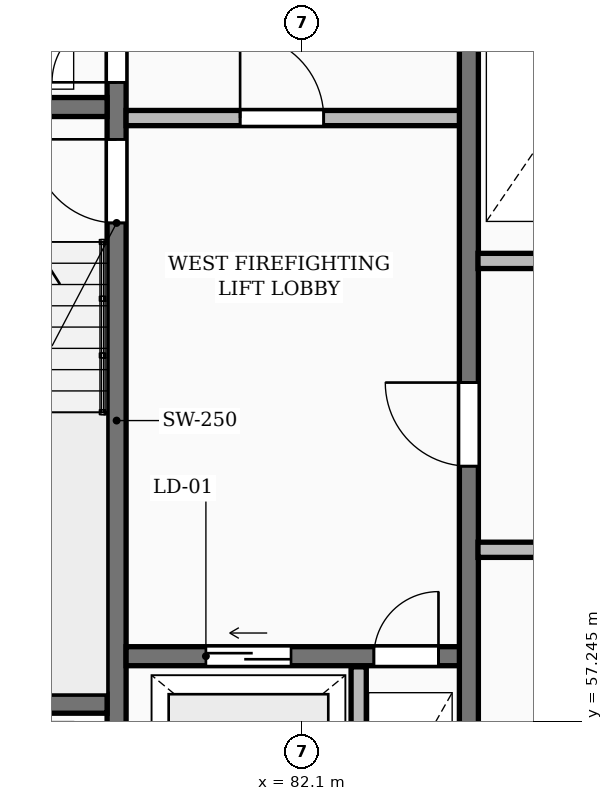
"""IFC4 building model, lengths in metres.
Left out: names, types, materials, properties, quantities, classifications, styles, units other than length and angle.
Written with IfcOpenShell. Run it as: python <this file> out.ifc"""

import sys

from ifc_helpers import new_model, si_unit, direction, frame, frame_2d, origin, place, context, subcontext, project, spatial, rectangle, extrude, element, fill, save


model = new_model("IFC4")
c1 = context("Model", 3, precision=1e-05, world=origin(), true_north=direction((0.0, 1.0)))
c2 = subcontext(c1, "Body", "Model", "MODEL_VIEW")
j1 = project(units=[si_unit("LENGTHUNIT", "METRE"), si_unit("PLANEANGLEUNIT", "RADIAN")], contexts=[c1])
p1 = place(None, origin())
s1 = spatial("IfcSite", under=j1, at=p1, CompositionType="ELEMENT")
p2 = place(p1, origin())
s2 = spatial("IfcBuilding", under=s1, at=p2, CompositionType="ELEMENT")
p3 = place(p2, frame((0.0, 0.0, 175.1)))
s3 = spatial("IfcBuildingStorey", under=s2, at=p3, CompositionType="ELEMENT", Elevation=175.1)
p4 = place(p3, frame((79.665, 55.4, 0.0), z_axis=(0.0, 0.0, 1.0), x_axis=(0.0, 1.0, 0.0)))
e1 = element("IfcWall", 1, at=p4, inside=s3, PredefinedType="SHEAR", context=c2, shape_type="SweptSolid", body=[
    extrude(rectangle(XDim=11.6, YDim=0.25, at=frame_2d((5.8, 0.0))), origin(), (0.0, 0.0, 1.0), 3.25),
])
p5 = place(p4, frame((0.55, 0.0, 0.0)))
e2 = element("IfcOpeningElement", 2, at=p5, cuts=e1, PredefinedType="OPENING", context=c2, shape_type="SweptSolid", body=[
    extrude(rectangle(XDim=0.85, YDim=2.05, at=frame_2d((0.425, 1.025))), frame((0.0, 0.135, 0.0), z_axis=(0.0, -1.0, 0.0), x_axis=(1.0, 0.0, 0.0)), (0.0, 0.0, 1.0), 0.27),
])
p6 = place(p4, frame((8.4, 0.0, 0.0)))
e3 = element("IfcOpeningElement", 3, at=p6, cuts=e1, PredefinedType="OPENING", context=c2, shape_type="SweptSolid", body=[
    extrude(rectangle(XDim=1.1, YDim=2.1, at=frame_2d((0.55, 1.05))), frame((0.0, 0.135, 0.0), z_axis=(0.0, -1.0, 0.0), x_axis=(1.0, 0.0, 0.0)), (0.0, 0.0, 1.0), 0.27),
])
p7 = place(p4, frame((10.25, 0.0, 0.0)))
e4 = element("IfcOpeningElement", 4, at=p7, cuts=e1, PredefinedType="OPENING", context=c2, shape_type="SweptSolid", body=[
    extrude(rectangle(XDim=0.85, YDim=2.05, at=frame_2d((0.425, 1.025))), frame((0.0, 0.135, 0.0), z_axis=(0.0, -1.0, 0.0), x_axis=(1.0, 0.0, 0.0)), (0.0, 0.0, 1.0), 0.27),
])
for number, where, z_axis, x_axis in (
    (5, (76.3, 57.475, 0.0), (0.0, 0.0, 1.0), (1.0, 0.0, 0.0)),
    (6, (76.3, 65.325, 0.0), (0.0, 0.0, 1.0), (1.0, 0.0, 0.0)),
):
    element("IfcWall", number, at=place(p3, frame(where, z_axis=z_axis, x_axis=x_axis)), inside=s3, PredefinedType="SHEAR", context=c2, shape_type="SweptSolid", body=[
        extrude(rectangle(XDim=3.24, YDim=0.25, at=frame_2d((1.62, 0.0))), origin(), (0.0, 0.0, 1.0), 3.25),
    ])
p8 = place(p3, frame((79.79, 58.1, 0.0), z_axis=(0.0, 0.0, 1.0), x_axis=(1.0, 0.0, 0.0)))
e7 = element("IfcWall", 7, at=p8, inside=s3, PredefinedType="SHEAR", context=c2, shape_type="SweptSolid", body=[
    extrude(rectangle(XDim=4.39, YDim=0.25, at=frame_2d((2.195, 0.0))), origin(), (0.0, 0.0, 1.0), 3.25),
])
p9 = place(p8, frame((1.05, 0.0, 0.0)))
e8 = element("IfcOpeningElement", 8, at=p9, cuts=e7, PredefinedType="OPENING", context=c2, shape_type="SweptSolid", body=[
    extrude(rectangle(XDim=1.12, YDim=2.12, at=frame_2d((0.56, 1.06))), frame((0.0, 0.135, 0.0), z_axis=(0.0, -1.0, 0.0), x_axis=(1.0, 0.0, 0.0)), (0.0, 0.0, 1.0), 0.27),
])
p10 = place(p8, frame((3.26, 0.0, 0.0)))
e9 = element("IfcOpeningElement", 9, at=p10, cuts=e7, PredefinedType="OPENING", context=c2, shape_type="SweptSolid", body=[
    extrude(rectangle(XDim=0.85, YDim=2.05, at=frame_2d((0.425, 1.025))), frame((0.0, 0.135, 0.0), z_axis=(0.0, -1.0, 0.0), x_axis=(1.0, 0.0, 0.0)), (0.0, 0.0, 1.0), 0.27),
])
p11 = place(p3, frame((82.85, 55.4, 0.0), z_axis=(0.0, 0.0, 1.0), x_axis=(0.0, 1.0, 0.0)))
e10 = element("IfcWall", 10, at=p11, inside=s3, PredefinedType="PARTITIONING", context=c2, shape_type="SweptSolid", body=[
    extrude(rectangle(XDim=2.56, YDim=0.2, at=frame_2d((1.28, 0.0))), origin(), (0.0, 0.0, 1.0), 2.97),
])
p12 = place(p3, frame((79.79, 65.18, 0.0), z_axis=(0.0, 0.0, 1.0), x_axis=(1.0, 0.0, 0.0)))
e11 = element("IfcWall", 11, at=p12, inside=s3, PredefinedType="PARTITIONING", context=c2, shape_type="SweptSolid", body=[
    extrude(rectangle(XDim=4.39, YDim=0.2, at=frame_2d((2.195, 0.0))), origin(), (0.0, 0.0, 1.0), 2.97),
])
p13 = place(p12, frame((1.5, 0.0, 0.0)))
e12 = element("IfcOpeningElement", 12, at=p13, cuts=e11, PredefinedType="OPENING", context=c2, shape_type="SweptSolid", body=[
    extrude(rectangle(XDim=1.1, YDim=2.1, at=frame_2d((0.55, 1.05))), frame((0.0, 0.11, 0.0), z_axis=(0.0, -1.0, 0.0), x_axis=(1.0, 0.0, 0.0)), (0.0, 0.0, 1.0), 0.22),
])
p14 = place(p3, frame((84.3, 55.4, 0.0), z_axis=(0.0, 0.0, 1.0), x_axis=(0.0, 1.0, 0.0)))
e13 = element("IfcWall", 13, at=p14, inside=s3, PredefinedType="SHEAR", context=c2, shape_type="SweptSolid", body=[
    extrude(rectangle(XDim=11.6, YDim=0.25, at=frame_2d((5.8, 0.0))), origin(), (0.0, 0.0, 1.0), 3.25),
])
p15 = place(p14, frame((5.2, 0.0, 0.0)))
e14 = element("IfcOpeningElement", 14, at=p15, cuts=e13, PredefinedType="OPENING", context=c2, shape_type="SweptSolid", body=[
    extrude(rectangle(XDim=1.1, YDim=2.1, at=frame_2d((0.55, 1.05))), frame((0.0, 0.135, 0.0), z_axis=(0.0, -1.0, 0.0), x_axis=(1.0, 0.0, 0.0)), (0.0, 0.0, 1.0), 0.27),
])
p16 = place(p3, frame((84.42, 59.5, 0.0), z_axis=(0.0, 0.0, 1.0), x_axis=(1.0, 0.0, 0.0)))
e15 = element("IfcWall", 15, at=p16, inside=s3, PredefinedType="PARTITIONING", context=c2, shape_type="SweptSolid", body=[
    extrude(rectangle(XDim=8.36, YDim=0.2, at=frame_2d((4.18, 0.0))), origin(), (0.0, 0.0, 1.0), 2.97),
])
p17 = place(p16, frame((3.4, 0.0, 0.0)))
e16 = element("IfcOpeningElement", 16, at=p17, cuts=e15, PredefinedType="OPENING", context=c2, shape_type="SweptSolid", body=[
    extrude(rectangle(XDim=0.92, YDim=2.08, at=frame_2d((0.46, 1.04))), frame((0.0, 0.11, 0.0), z_axis=(0.0, -1.0, 0.0), x_axis=(1.0, 0.0, 0.0)), (0.0, 0.0, 1.0), 0.22),
])
p18 = place(p3, frame((84.42, 63.3, 0.0), z_axis=(0.0, 0.0, 1.0), x_axis=(1.0, 0.0, 0.0)))
e17 = element("IfcWall", 17, at=p18, inside=s3, PredefinedType="PARTITIONING", context=c2, shape_type="SweptSolid", body=[
    extrude(rectangle(XDim=19.83, YDim=0.2, at=frame_2d((9.915, 0.0))), origin(), (0.0, 0.0, 1.0), 2.97),
])
p19 = place(p18, frame((1.15, 0.0, 0.0)))
e18 = element("IfcOpeningElement", 18, at=p19, cuts=e17, PredefinedType="OPENING", context=c2, shape_type="SweptSolid", body=[
    extrude(rectangle(XDim=0.85, YDim=2.05, at=frame_2d((0.425, 1.025))), frame((0.0, 0.11, 0.0), z_axis=(0.0, -1.0, 0.0), x_axis=(1.0, 0.0, 0.0)), (0.0, 0.0, 1.0), 0.22),
])
p20 = place(p18, frame((3.25, 0.0, 0.0)))
e19 = element("IfcOpeningElement", 19, at=p20, cuts=e17, PredefinedType="OPENING", context=c2, shape_type="SweptSolid", body=[
    extrude(rectangle(XDim=0.85, YDim=2.05, at=frame_2d((0.425, 1.025))), frame((0.0, 0.11, 0.0), z_axis=(0.0, -1.0, 0.0), x_axis=(1.0, 0.0, 0.0)), (0.0, 0.0, 1.0), 0.22),
])
p21 = place(p18, frame((13.08, 0.0, 0.0)))
e20 = element("IfcOpeningElement", 20, at=p21, cuts=e17, PredefinedType="OPENING", context=c2, shape_type="SweptSolid", body=[
    extrude(rectangle(XDim=1.5, YDim=2.2, at=frame_2d((0.75, 1.1))), frame((0.0, 0.11, 0.0), z_axis=(0.0, -1.0, 0.0), x_axis=(1.0, 0.0, 0.0)), (0.0, 0.0, 1.0), 0.22),
])
p22 = place(p18, frame((6.68, 0.0, 0.0)))
e21 = element("IfcOpeningElement", 21, at=p22, cuts=e17, PredefinedType="OPENING", context=c2, shape_type="SweptSolid", body=[
    extrude(rectangle(XDim=0.92, YDim=2.08, at=frame_2d((0.46, 1.04))), frame((0.0, 0.11, 0.0), z_axis=(0.0, -1.0, 0.0), x_axis=(1.0, 0.0, 0.0)), (0.0, 0.0, 1.0), 0.22),
])
p23 = place(p18, frame((16.33, 0.0, 0.0)))
e22 = element("IfcOpeningElement", 22, at=p23, cuts=e17, PredefinedType="OPENING", context=c2, shape_type="SweptSolid", body=[
    extrude(rectangle(XDim=0.88, YDim=2.06, at=frame_2d((0.44, 1.03))), frame((0.0, 0.11, 0.0), z_axis=(0.0, -1.0, 0.0), x_axis=(1.0, 0.0, 0.0)), (0.0, 0.0, 1.0), 0.22),
])
p24 = place(p6, origin())
e23 = element("IfcDoor", 23, at=p24, inside=s3, OperationType="SINGLE_SWING_RIGHT", PredefinedType="DOOR", context=c2, shape_type="SweptSolid", body=[
    extrude(rectangle(XDim=1.1, YDim=2.1, at=frame_2d((0.55, 1.05))), frame((0.0, 0.025, 0.0), z_axis=(0.0, -1.0, 0.0), x_axis=(1.0, 0.0, 0.0)), (0.0, 0.0, 1.0), 0.05),
])
fill(e3, e23)
p25 = place(p7, origin())
e24 = element("IfcDoor", 24, at=p25, inside=s3, OperationType="SINGLE_SWING_LEFT", PredefinedType="DOOR", context=c2, shape_type="SweptSolid", body=[
    extrude(rectangle(XDim=0.85, YDim=2.05, at=frame_2d((0.425, 1.025))), frame((0.0, 0.025, 0.0), z_axis=(0.0, -1.0, 0.0), x_axis=(1.0, 0.0, 0.0)), (0.0, 0.0, 1.0), 0.05),
])
fill(e4, e24)
p26 = place(p9, origin())
e25 = element("IfcDoor", 25, at=p26, inside=s3, OperationType="SLIDING_TO_LEFT", PredefinedType="DOOR", context=c2, shape_type="SweptSolid", body=[
    extrude(rectangle(XDim=1.12, YDim=2.12, at=frame_2d((0.56, 1.06))), frame((0.0, 0.025, 0.0), z_axis=(0.0, -1.0, 0.0), x_axis=(1.0, 0.0, 0.0)), (0.0, 0.0, 1.0), 0.05),
])
fill(e8, e25)
p27 = place(p10, origin())
e26 = element("IfcDoor", 26, at=p27, inside=s3, OperationType="SINGLE_SWING_RIGHT", PredefinedType="DOOR", context=c2, shape_type="SweptSolid", body=[
    extrude(rectangle(XDim=0.85, YDim=2.05, at=frame_2d((0.425, 1.025))), frame((0.0, 0.025, 0.0), z_axis=(0.0, -1.0, 0.0), x_axis=(1.0, 0.0, 0.0)), (0.0, 0.0, 1.0), 0.05),
])
fill(e9, e26)
p28 = place(p13, origin())
e27 = element("IfcDoor", 27, at=p28, inside=s3, OperationType="SINGLE_SWING_LEFT", PredefinedType="DOOR", context=c2, shape_type="SweptSolid", body=[
    extrude(rectangle(XDim=1.1, YDim=2.1, at=frame_2d((0.55, 1.05))), frame((0.0, 0.025, 0.0), z_axis=(0.0, -1.0, 0.0), x_axis=(1.0, 0.0, 0.0)), (0.0, 0.0, 1.0), 0.05),
])
fill(e12, e27)
p29 = place(p15, origin())
e28 = element("IfcDoor", 28, at=p29, inside=s3, OperationType="SINGLE_SWING_RIGHT", PredefinedType="DOOR", context=c2, shape_type="SweptSolid", body=[
    extrude(rectangle(XDim=1.1, YDim=2.1, at=frame_2d((0.55, 1.05))), frame((0.0, 0.025, 0.0), z_axis=(0.0, -1.0, 0.0), x_axis=(1.0, 0.0, 0.0)), (0.0, 0.0, 1.0), 0.05),
])
fill(e14, e28)
save(model, sys.argv[1])
